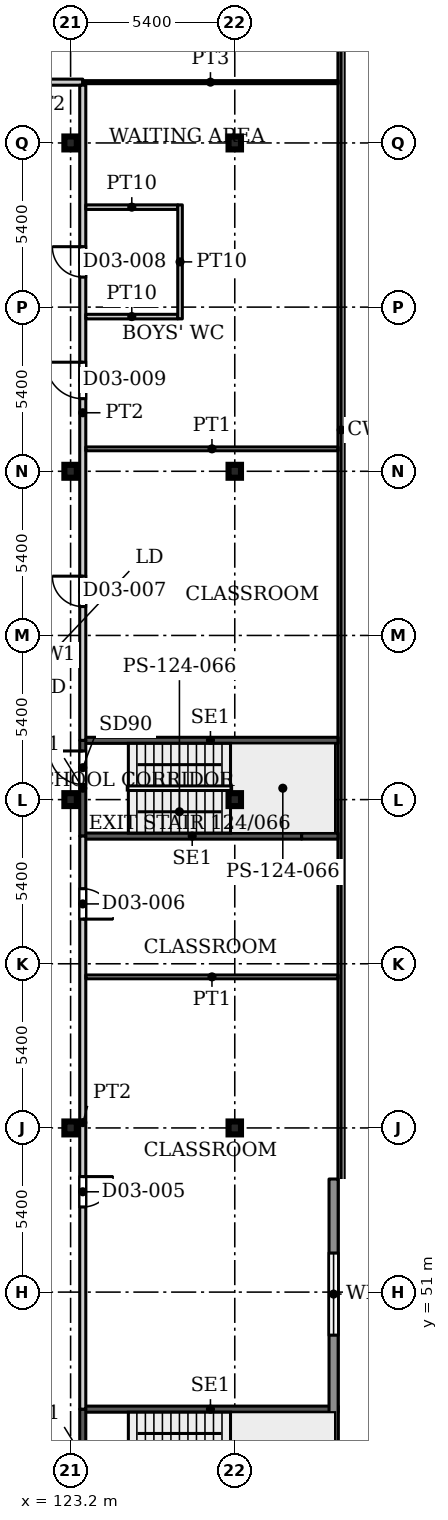
"""IFC4 building model, lengths in metres.
Left out: names, types, materials, properties, quantities, classifications, styles, units other than length and angle.
Written with IfcOpenShell. Run it as: python <this file> out.ifc"""

import sys

from ifc_helpers import new_model, si_unit, direction, frame, frame_2d, origin, origin_2d, place, context, subcontext, project, spatial, rectangle, i_section, extrude, source, transform, mapped, element, fill, save


model = new_model("IFC4")
c1 = context("Model", 3, precision=1e-05, world=origin(), true_north=direction((0.0, 1.0)))
c2 = subcontext(c1, "Body", "Model", "MODEL_VIEW")
j1 = project(units=[si_unit("LENGTHUNIT", "METRE"), si_unit("PLANEANGLEUNIT", "RADIAN")], contexts=[c1])
p1 = place(None, origin())
s1 = spatial("IfcSite", under=j1, at=p1, CompositionType="ELEMENT")
p2 = place(p1, origin())
s2 = spatial("IfcBuilding", under=s1, at=p2, CompositionType="ELEMENT")
p3 = place(p2, frame((0.0, 0.0, 17.0)))
s3 = spatial("IfcBuildingStorey", under=s2, at=p3, CompositionType="ELEMENT", Elevation=17.0)
for number, where, z_axis, x_axis in (
    (1, (123.2, 56.4, 0.0), (0.0, 0.0, 1.0), (1.0, 0.0, 0.0)),
    (2, (128.6, 56.4, 0.0), (0.0, 0.0, 1.0), (1.0, 0.0, 0.0)),
    (3, (123.2, 67.2, 0.0), (0.0, 0.0, 1.0), (1.0, 0.0, 0.0)),
    (4, (128.6, 67.2, 0.0), (0.0, 0.0, 1.0), (1.0, 0.0, 0.0)),
    (5, (123.2, 78.0, 0.0), (0.0, 0.0, 1.0), (1.0, 0.0, 0.0)),
    (6, (128.6, 78.0, 0.0), (0.0, 0.0, 1.0), (1.0, 0.0, 0.0)),
    (7, (123.2, 88.8, 0.0), (0.0, 0.0, 1.0), (1.0, 0.0, 0.0)),
    (8, (128.6, 88.8, 0.0), (0.0, 0.0, 1.0), (1.0, 0.0, 0.0)),
):
    element("IfcColumn", number, at=place(p3, frame(where, z_axis=z_axis, x_axis=x_axis)), inside=s3, PredefinedType="COLUMN", context=c2, shape_type="SweptSolid", body=[
        extrude(i_section(OverallWidth=0.409, OverallDepth=0.425, WebThickness=0.033, FlangeThickness=0.052, FilletRadius=0.013, at=origin_2d()), origin(), (0.0, 0.0, 1.0), 4.5),
    ])
p4 = place(p3, frame((131.85, 54.72, 0.0), z_axis=(0.0, 0.0, 1.0), x_axis=(0.0, -1.0, 0.0)))
e9 = element("IfcWall", 9, at=p4, inside=s3, PredefinedType="SOLIDWALL", context=c2, shape_type="SweptSolid", body=[
    extrude(rectangle(XDim=38.72, YDim=0.3, at=frame_2d((19.36, 0.0))), origin(), (0.0, 0.0, 1.0), 4.25),
])
p5 = place(p4, frame((2.435, 0.0, 0.9)))
e10 = element("IfcOpeningElement", 10, at=p5, cuts=e9, PredefinedType="OPENING", context=c2, shape_type="SweptSolid", body=[
    extrude(rectangle(XDim=2.7, YDim=2.1, at=frame_2d((1.35, 1.05))), frame((0.0, 0.16, 0.0), z_axis=(0.0, -1.0, 0.0), x_axis=(1.0, 0.0, 0.0)), (0.0, 0.0, 1.0), 0.32),
])
p6 = place(p4, frame((13.58, 0.0, 0.9)))
e11 = element("IfcOpeningElement", 11, at=p6, cuts=e9, PredefinedType="OPENING", context=c2, shape_type="SweptSolid", body=[
    extrude(rectangle(XDim=2.7, YDim=2.1, at=frame_2d((1.35, 1.05))), frame((0.0, 0.16, 0.0), z_axis=(0.0, -1.0, 0.0), x_axis=(1.0, 0.0, 0.0)), (0.0, 0.0, 1.0), 0.32),
])
p7 = place(p4, frame((26.16, 0.0, 0.9)))
e12 = element("IfcOpeningElement", 12, at=p7, cuts=e9, PredefinedType="OPENING", context=c2, shape_type="SweptSolid", body=[
    extrude(rectangle(XDim=2.7, YDim=2.1, at=frame_2d((1.35, 1.05))), frame((0.0, 0.16, 0.0), z_axis=(0.0, -1.0, 0.0), x_axis=(1.0, 0.0, 0.0)), (0.0, 0.0, 1.0), 0.32),
])
p8 = place(p3, frame((123.6, 47.15, 0.0), z_axis=(0.0, 0.0, 1.0), x_axis=(1.0, 0.0, 0.0)))
e13 = element("IfcWall", 13, at=p8, inside=s3, PredefinedType="SHEAR", context=c2, shape_type="SweptSolid", body=[
    extrude(rectangle(XDim=8.4, YDim=0.2, at=frame_2d((4.2, 0.0))), origin(), (0.0, 0.0, 1.0), 4.5),
])
p9 = place(p3, frame((123.6, 44.0, 0.0), z_axis=(0.0, 0.0, 1.0), x_axis=(0.0, 1.0, 0.0)))
e14 = element("IfcWall", 14, at=p9, inside=s3, PredefinedType="SHEAR", context=c2, shape_type="SweptSolid", body=[
    extrude(rectangle(XDim=3.15, YDim=0.2, at=frame_2d((1.575, 0.0))), origin(), (0.0, 0.0, 1.0), 4.5),
])
p10 = place(p9, frame((0.15, 0.0, 0.0)))
e15 = element("IfcOpeningElement", 15, at=p10, cuts=e14, PredefinedType="OPENING", context=c2, shape_type="SweptSolid", body=[
    extrude(rectangle(XDim=1.1, YDim=2.2, at=frame_2d((0.55, 1.1))), frame((0.0, 0.11, 0.0), z_axis=(0.0, -1.0, 0.0), x_axis=(1.0, 0.0, 0.0)), (0.0, 0.0, 1.0), 0.22),
])
p11 = place(p3, frame((123.6, 66.0, 0.0), z_axis=(0.0, 0.0, 1.0), x_axis=(1.0, 0.0, 0.0)))
e16 = element("IfcWall", 16, at=p11, inside=s3, PredefinedType="SHEAR", context=c2, shape_type="SweptSolid", body=[
    extrude(rectangle(XDim=7.2, YDim=0.2, at=frame_2d((3.6, 0.0))), origin(), (0.0, 0.0, 1.0), 4.5),
])
p12 = place(p3, frame((130.8, 66.0, 0.0), z_axis=(0.0, 0.0, 1.0), x_axis=(1.0, 0.0, 0.0)))
e17 = element("IfcWall", 17, at=p12, inside=s3, PredefinedType="SHEAR", context=c2, shape_type="SweptSolid", body=[
    extrude(rectangle(XDim=1.2, YDim=0.2, at=frame_2d((0.6, 0.0))), origin(), (0.0, 0.0, 1.0), 4.5),
])
p13 = place(p3, frame((123.6, 69.15, 0.0), z_axis=(0.0, 0.0, 1.0), x_axis=(1.0, 0.0, 0.0)))
e18 = element("IfcWall", 18, at=p13, inside=s3, PredefinedType="SHEAR", context=c2, shape_type="SweptSolid", body=[
    extrude(rectangle(XDim=8.4, YDim=0.2, at=frame_2d((4.2, 0.0))), origin(), (0.0, 0.0, 1.0), 4.5),
])
p14 = place(p3, frame((123.6, 66.0, 0.0), z_axis=(0.0, 0.0, 1.0), x_axis=(0.0, 1.0, 0.0)))
e19 = element("IfcWall", 19, at=p14, inside=s3, PredefinedType="SHEAR", context=c2, shape_type="SweptSolid", body=[
    extrude(rectangle(XDim=3.15, YDim=0.2, at=frame_2d((1.575, 0.0))), origin(), (0.0, 0.0, 1.0), 4.5),
])
p15 = place(p14, frame((1.7, 0.0, 0.0)))
e20 = element("IfcOpeningElement", 20, at=p15, cuts=e19, PredefinedType="OPENING", context=c2, shape_type="SweptSolid", body=[
    extrude(rectangle(XDim=1.1, YDim=2.2, at=frame_2d((0.55, 1.1))), frame((0.0, 0.11, 0.0), z_axis=(0.0, -1.0, 0.0), x_axis=(1.0, 0.0, 0.0)), (0.0, 0.0, 1.0), 0.22),
])
p16 = place(p3, frame((121.2, 90.8, 0.0), z_axis=(0.0, 0.0, 1.0), x_axis=(1.0, 0.0, 0.0)))
e21 = element("IfcWall", 21, at=p16, inside=s3, PredefinedType="PARTITIONING", context=c2, shape_type="SweptSolid", body=[
    extrude(rectangle(XDim=2.4, YDim=0.2, at=frame_2d((1.2, 0.0))), origin(), (0.0, 0.0, 1.0), 4.18),
])
p17 = place(p3, frame((123.6, 47.15, 0.0), z_axis=(0.0, 0.0, 1.0), x_axis=(0.0, 1.0, 0.0)))
e22 = element("IfcWall", 22, at=p17, inside=s3, PredefinedType="PARTITIONING", context=c2, shape_type="SweptSolid", body=[
    extrude(rectangle(XDim=18.85, YDim=0.2, at=frame_2d((9.425, 0.0))), origin(), (0.0, 0.0, 1.0), 4.18),
])
p18 = place(p17, frame((6.65, 0.0, 0.0)))
e23 = element("IfcOpeningElement", 23, at=p18, cuts=e22, PredefinedType="OPENING", context=c2, shape_type="SweptSolid", body=[
    extrude(rectangle(XDim=1.0, YDim=2.1, at=frame_2d((0.5, 1.05))), frame((0.0, 0.11, 0.0), z_axis=(0.0, -1.0, 0.0), x_axis=(1.0, 0.0, 0.0)), (0.0, 0.0, 1.0), 0.22),
])
p19 = place(p17, frame((16.119, 0.0, 0.0)))
e24 = element("IfcOpeningElement", 24, at=p19, cuts=e22, PredefinedType="OPENING", context=c2, shape_type="SweptSolid", body=[
    extrude(rectangle(XDim=1.0, YDim=2.1, at=frame_2d((0.5, 1.05))), frame((0.0, 0.11, 0.0), z_axis=(0.0, -1.0, 0.0), x_axis=(1.0, 0.0, 0.0)), (0.0, 0.0, 1.0), 0.22),
])
p20 = place(p3, frame((123.6, 69.15, 0.0), z_axis=(0.0, 0.0, 1.0), x_axis=(0.0, 1.0, 0.0)))
e25 = element("IfcWall", 25, at=p20, inside=s3, PredefinedType="PARTITIONING", context=c2, shape_type="SweptSolid", body=[
    extrude(rectangle(XDim=21.55, YDim=0.2, at=frame_2d((10.775, 0.0))), origin(), (0.0, 0.0, 1.0), 4.18),
])
p21 = place(p20, frame((4.4, 0.0, 0.0)))
e26 = element("IfcOpeningElement", 26, at=p21, cuts=e25, PredefinedType="OPENING", context=c2, shape_type="SweptSolid", body=[
    extrude(rectangle(XDim=1.0, YDim=2.1, at=frame_2d((0.5, 1.05))), frame((0.0, 0.11, 0.0), z_axis=(0.0, -1.0, 0.0), x_axis=(1.0, 0.0, 0.0)), (0.0, 0.0, 1.0), 0.22),
])
p22 = place(p20, frame((15.238, 0.0, 0.0)))
e27 = element("IfcOpeningElement", 27, at=p22, cuts=e25, PredefinedType="OPENING", context=c2, shape_type="SweptSolid", body=[
    extrude(rectangle(XDim=1.0, YDim=2.1, at=frame_2d((0.5, 1.05))), frame((0.0, 0.11, 0.0), z_axis=(0.0, -1.0, 0.0), x_axis=(1.0, 0.0, 0.0)), (0.0, 0.0, 1.0), 0.22),
])
p23 = place(p20, frame((11.238, 0.0, 0.0)))
e28 = element("IfcOpeningElement", 28, at=p23, cuts=e25, PredefinedType="OPENING", context=c2, shape_type="SweptSolid", body=[
    extrude(rectangle(XDim=1.2, YDim=2.1, at=frame_2d((0.6, 1.05))), frame((0.0, 0.11, 0.0), z_axis=(0.0, -1.0, 0.0), x_axis=(1.0, 0.0, 0.0)), (0.0, 0.0, 1.0), 0.22),
])
p24 = place(p3, frame((123.6, 90.8, 0.0), z_axis=(0.0, 0.0, 1.0), x_axis=(1.0, 0.0, 0.0)))
e29 = element("IfcWall", 29, at=p24, inside=s3, PredefinedType="PARTITIONING", context=c2, shape_type="SweptSolid", body=[
    extrude(rectangle(XDim=8.4, YDim=0.1, at=frame_2d((4.2, 0.0))), origin(), (0.0, 0.0, 1.0), 4.18),
])
for number, where, z_axis, x_axis in (
    (30, (123.7, 61.369, 0.0), (0.0, 0.0, 1.0), (1.0, 0.0, 0.0)),
    (31, (123.7, 78.738, 0.0), (0.0, 0.0, 1.0), (1.0, 0.0, 0.0)),
):
    element("IfcWall", number, at=place(p3, frame(where, z_axis=z_axis, x_axis=x_axis)), inside=s3, PredefinedType="PARTITIONING", context=c2, shape_type="SweptSolid", body=[
        extrude(rectangle(XDim=8.3, YDim=0.125, at=frame_2d((4.15, 0.0))), origin(), (0.0, 0.0, 1.0), 4.18),
    ])
for number, where, z_axis, x_axis in (
    (32, (123.7, 83.088, 0.0), (0.0, 0.0, 1.0), (1.0, 0.0, 0.0)),
    (33, (123.7, 86.688, 0.0), (0.0, 0.0, 1.0), (1.0, 0.0, 0.0)),
):
    element("IfcWall", number, at=place(p3, frame(where, z_axis=z_axis, x_axis=x_axis)), inside=s3, PredefinedType="PARTITIONING", context=c2, shape_type="SweptSolid", body=[
        extrude(rectangle(XDim=3.025, YDim=0.15, at=frame_2d((1.513, 0.0))), origin(), (0.0, 0.0, 1.0), 4.18),
    ])
p25 = place(p3, frame((126.8, 83.013, 0.0), z_axis=(0.0, 0.0, 1.0), x_axis=(0.0, 1.0, 0.0)))
e34 = element("IfcWall", 34, at=p25, inside=s3, PredefinedType="PARTITIONING", context=c2, shape_type="SweptSolid", body=[
    extrude(rectangle(XDim=3.75, YDim=0.15, at=frame_2d((1.875, 0.0))), origin(), (0.0, 0.0, 1.0), 4.18),
])
m1 = source(origin(), c2, "Body", "SweptSolid", [
    extrude(rectangle(XDim=2.7, YDim=2.1, at=frame_2d((1.35, 1.05))), frame((0.0, 0.03, 0.0), z_axis=(0.0, -1.0, 0.0), x_axis=(1.0, 0.0, 0.0)), (0.0, 0.0, 1.0), 0.06),
])
p26 = place(p5, origin())
e35 = element("IfcWindow", 35, at=p26, inside=s3, PartitioningType="SINGLE_PANEL", PredefinedType="WINDOW", context=c2, shape_type="MappedRepresentation", body=[
    mapped(m1, transform((0.0, 0.0, 0.0), x_axis=(1.0, 0.0, 0.0), y_axis=(0.0, 1.0, 0.0), z_axis=(0.0, 0.0, 1.0), scale=1.0)),
])
fill(e10, e35)
m2 = source(origin(), c2, "Body", "SweptSolid", [
    extrude(rectangle(XDim=1.1, YDim=2.2, at=frame_2d((0.55, 1.1))), frame((0.0, 0.025, 0.0), z_axis=(0.0, -1.0, 0.0), x_axis=(1.0, 0.0, 0.0)), (0.0, 0.0, 1.0), 0.05),
])
p27 = place(p15, origin())
e36 = element("IfcDoor", 36, at=p27, inside=s3, OperationType="SINGLE_SWING_LEFT", PredefinedType="DOOR", context=c2, shape_type="MappedRepresentation", body=[
    mapped(m2, transform((0.0, 0.0, 0.0), x_axis=(1.0, 0.0, 0.0), y_axis=(0.0, 1.0, 0.0), z_axis=(0.0, 0.0, 1.0), scale=1.0)),
])
fill(e20, e36)
m3 = source(origin(), c2, "Body", "SweptSolid", [
    extrude(rectangle(XDim=1.0, YDim=2.1, at=frame_2d((0.5, 1.05))), frame((0.0, 0.025, 0.0), z_axis=(0.0, -1.0, 0.0), x_axis=(1.0, 0.0, 0.0)), (0.0, 0.0, 1.0), 0.05),
])
p28 = place(p18, origin())
e37 = element("IfcDoor", 37, at=p28, inside=s3, OperationType="SINGLE_SWING_RIGHT", PredefinedType="DOOR", context=c2, shape_type="MappedRepresentation", body=[
    mapped(m3, transform((0.0, 0.0, 0.0), x_axis=(1.0, 0.0, 0.0), y_axis=(0.0, 1.0, 0.0), z_axis=(0.0, 0.0, 1.0), scale=1.0)),
])
fill(e23, e37)
p29 = place(p19, origin())
e38 = element("IfcDoor", 38, at=p29, inside=s3, OperationType="SINGLE_SWING_RIGHT", PredefinedType="DOOR", context=c2, shape_type="MappedRepresentation", body=[
    mapped(m3, transform((0.0, 0.0, 0.0), x_axis=(1.0, 0.0, 0.0), y_axis=(0.0, 1.0, 0.0), z_axis=(0.0, 0.0, 1.0), scale=1.0)),
])
fill(e24, e38)
p30 = place(p21, origin())
e39 = element("IfcDoor", 39, at=p30, inside=s3, OperationType="SINGLE_SWING_LEFT", PredefinedType="DOOR", context=c2, shape_type="MappedRepresentation", body=[
    mapped(m3, transform((0.0, 0.0, 0.0), x_axis=(1.0, 0.0, 0.0), y_axis=(0.0, 1.0, 0.0), z_axis=(0.0, 0.0, 1.0), scale=1.0)),
])
fill(e26, e39)
p31 = place(p22, origin())
e40 = element("IfcDoor", 40, at=p31, inside=s3, OperationType="SINGLE_SWING_LEFT", PredefinedType="DOOR", context=c2, shape_type="MappedRepresentation", body=[
    mapped(m3, transform((0.0, 0.0, 0.0), x_axis=(1.0, 0.0, 0.0), y_axis=(0.0, 1.0, 0.0), z_axis=(0.0, 0.0, 1.0), scale=1.0)),
])
fill(e27, e40)
m4 = source(origin(), c2, "Body", "SweptSolid", [
    extrude(rectangle(XDim=1.2, YDim=2.1, at=frame_2d((0.6, 1.05))), frame((0.0, 0.025, 0.0), z_axis=(0.0, -1.0, 0.0), x_axis=(1.0, 0.0, 0.0)), (0.0, 0.0, 1.0), 0.05),
])
p32 = place(p23, origin())
e41 = element("IfcDoor", 41, at=p32, inside=s3, OperationType="SINGLE_SWING_LEFT", PredefinedType="DOOR", context=c2, shape_type="MappedRepresentation", body=[
    mapped(m4, transform((0.0, 0.0, 0.0), x_axis=(1.0, 0.0, 0.0), y_axis=(0.0, 1.0, 0.0), z_axis=(0.0, 0.0, 1.0), scale=1.0)),
])
fill(e28, e41)
save(model, sys.argv[1])
